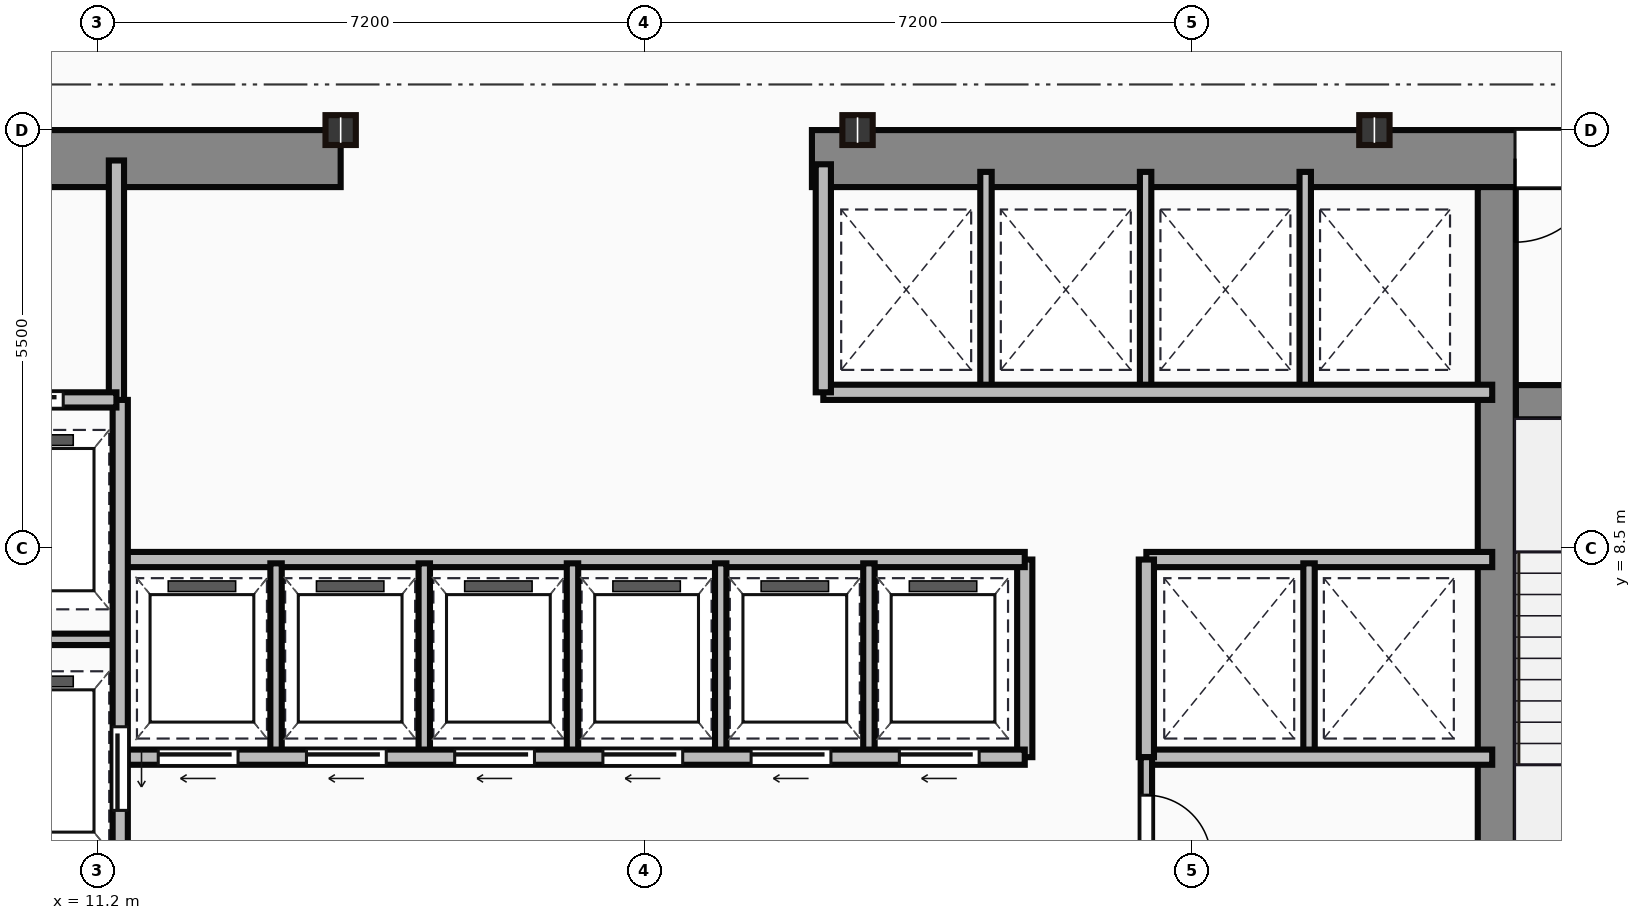
"""IFC4 building model, lengths in metres.
Left out: names, types, materials, properties, quantities, classifications, styles, units other than length and angle.
Written with IfcOpenShell. Run it as: python <this file> out.ifc"""

import sys

from ifc_helpers import new_model, si_unit, direction, frame, frame_2d, origin, origin_2d, place, context, subcontext, project, spatial, rectangle, i_section, extrude, source, transform, mapped, element, fill, save


model = new_model("IFC4")
c1 = context("Model", 3, precision=1e-05, world=origin(), true_north=direction((0.0, 1.0)))
c2 = subcontext(c1, "Body", "Model", "MODEL_VIEW")
j1 = project(units=[si_unit("LENGTHUNIT", "METRE"), si_unit("PLANEANGLEUNIT", "RADIAN")], contexts=[c1])
p1 = place(None, origin())
s1 = spatial("IfcSite", under=j1, at=p1, CompositionType="ELEMENT")
p2 = place(p1, origin())
s2 = spatial("IfcBuilding", under=s1, at=p2, CompositionType="ELEMENT")
p3 = place(p2, frame((0.0, 0.0, 117.85)))
s3 = spatial("IfcBuildingStorey", under=s2, at=p3, CompositionType="ELEMENT", Elevation=117.85)
m1 = source(origin(), c2, "Body", "SweptSolid", [
    extrude(rectangle(XDim=9.1, YDim=0.75, at=frame_2d((4.55, 0.0))), origin(), (0.0, 0.0, 1.0), 3.65),
])
p4 = place(p3, frame((5.3, 13.625, 0.0), z_axis=(0.0, 0.0, 1.0), x_axis=(1.0, 0.0, 0.0)))
e1 = element("IfcWall", 1, at=p4, inside=s3, PredefinedType="SHEAR", context=c2, shape_type="MappedRepresentation", body=[
    mapped(m1, transform((0.0, 0.0, 0.0))),
])
p5 = place(p4, frame((4.1, 0.0, 0.0)))
e2 = element("IfcOpeningElement", 2, at=p5, cuts=e1, PredefinedType="OPENING", context=c2, shape_type="SweptSolid", body=[
    extrude(rectangle(XDim=1.1, YDim=2.15, at=frame_2d((0.55, 1.075))), frame((0.0, 0.385, 0.0), z_axis=(0.0, -1.0, 0.0), x_axis=(1.0, 0.0, 0.0)), (0.0, 0.0, 1.0), 0.77),
])
m2 = source(origin(), c2, "Body", "SweptSolid", [
    extrude(rectangle(XDim=12.6, YDim=0.75, at=frame_2d((6.3, 0.0))), origin(), (0.0, 0.0, 1.0), 3.65),
])
p6 = place(p3, frame((20.6, 13.625, 0.0), z_axis=(0.0, 0.0, 1.0), x_axis=(1.0, 0.0, 0.0)))
e3 = element("IfcWall", 3, at=p6, inside=s3, PredefinedType="SHEAR", context=c2, shape_type="MappedRepresentation", body=[
    mapped(m2, transform((0.0, 0.0, 0.0))),
])
p7 = place(p6, frame((9.25, 0.0, 0.0)))
e4 = element("IfcOpeningElement", 4, at=p7, cuts=e3, PredefinedType="OPENING", context=c2, shape_type="SweptSolid", body=[
    extrude(rectangle(XDim=1.1, YDim=2.15, at=frame_2d((0.55, 1.075))), frame((0.0, 0.385, 0.0), z_axis=(0.0, -1.0, 0.0), x_axis=(1.0, 0.0, 0.0)), (0.0, 0.0, 1.0), 0.77),
])
m3 = source(origin(), c2, "Body", "SweptSolid", [
    extrude(rectangle(XDim=12.35, YDim=0.5, at=frame_2d((6.175, 0.0))), origin(), (0.0, 0.0, 1.0), 3.65),
])
p8 = place(p3, frame((29.61, 0.9, 0.0), z_axis=(0.0, 0.0, 1.0), x_axis=(0.0, 1.0, 0.0)))
e5 = element("IfcWall", 5, at=p8, inside=s3, PredefinedType="SHEAR", context=c2, shape_type="MappedRepresentation", body=[
    mapped(m3, transform((0.0, 0.0, 0.0))),
])
m4 = source(origin(), c2, "Body", "SweptSolid", [
    extrude(rectangle(XDim=3.39, YDim=0.45, at=frame_2d((1.695, 0.0))), origin(), (0.0, 0.0, 1.0), 3.65),
])
p9 = place(p3, frame((29.86, 10.42, 0.0), z_axis=(0.0, 0.0, 1.0), x_axis=(1.0, 0.0, 0.0)))
e6 = element("IfcWall", 6, at=p9, inside=s3, PredefinedType="SHEAR", context=c2, shape_type="MappedRepresentation", body=[
    mapped(m4, transform((0.0, 0.0, 0.0))),
])
p10 = place(p9, frame((1.1, 0.0, 0.0)))
e7 = element("IfcOpeningElement", 7, at=p10, cuts=e6, PredefinedType="OPENING", context=c2, shape_type="SweptSolid", body=[
    extrude(rectangle(XDim=1.1, YDim=2.15, at=frame_2d((0.55, 1.075))), frame((0.0, 0.235, 0.0), z_axis=(0.0, -1.0, 0.0), x_axis=(1.0, 0.0, 0.0)), (0.0, 0.0, 1.0), 0.47),
])
m5 = source(origin(), c2, "Body", "SweptSolid", [
    extrude(i_section(OverallWidth=0.399, OverallDepth=0.393, WebThickness=0.023, FlangeThickness=0.037, at=origin_2d()), origin(), (0.0, 0.0, 1.0), 3.65),
])
for number, where, z_axis, x_axis in (
    (8, (14.4, 14.0, 0.0), (0.0, 0.0, 1.0), (1.0, 0.0, 0.0)),
    (9, (21.2, 14.0, 0.0), (0.0, 0.0, 1.0), (1.0, 0.0, 0.0)),
    (10, (28.0, 14.0, 0.0), (0.0, 0.0, 1.0), (1.0, 0.0, 0.0)),
):
    element("IfcColumn", number, at=place(p3, frame(where, z_axis=z_axis, x_axis=x_axis)), inside=s3, PredefinedType="COLUMN", context=c2, shape_type="MappedRepresentation", body=[
        mapped(m5, transform((0.0, 0.0, 0.0))),
    ])
m6 = source(origin(), c2, "Body", "SweptSolid", [
    extrude(rectangle(XDim=3.18, YDim=0.2, at=frame_2d((1.59, 0.0))), origin(), (0.0, 0.0, 1.0), 3.4),
])
p11 = place(p3, frame((11.45, 10.42, 0.0), z_axis=(0.0, 0.0, 1.0), x_axis=(0.0, 1.0, 0.0)))
e11 = element("IfcWall", 11, at=p11, inside=s3, PredefinedType="PARTITIONING", context=c2, shape_type="MappedRepresentation", body=[
    mapped(m6, transform((0.0, 0.0, 0.0))),
])
m7 = source(origin(), c2, "Body", "SweptSolid", [
    extrude(rectangle(XDim=2.35, YDim=0.2, at=frame_2d((1.175, 0.0))), origin(), (0.0, 0.0, 1.0), 3.4),
])
p12 = place(p3, frame((9.1, 10.45, 0.0), z_axis=(0.0, 0.0, 1.0), x_axis=(1.0, 0.0, 0.0)))
e12 = element("IfcWall", 12, at=p12, inside=s3, PredefinedType="PARTITIONING", context=c2, shape_type="MappedRepresentation", body=[
    mapped(m7, transform((0.0, 0.0, 0.0))),
])
p13 = place(p12, frame((0.55, 0.0, 0.0)))
e13 = element("IfcOpeningElement", 13, at=p13, cuts=e12, PredefinedType="OPENING", context=c2, shape_type="SweptSolid", body=[
    extrude(rectangle(XDim=1.1, YDim=2.15, at=frame_2d((0.55, 1.075))), frame((0.0, 0.11, 0.0), z_axis=(0.0, -1.0, 0.0), x_axis=(1.0, 0.0, 0.0)), (0.0, 0.0, 1.0), 0.22),
])
m8 = source(origin(), c2, "Body", "SweptSolid", [
    extrude(rectangle(XDim=9.6, YDim=0.2, at=frame_2d((4.8, 0.0))), origin(), (0.0, 0.0, 1.0), 3.4),
])
p14 = place(p3, frame((11.5, 0.85, 0.0), z_axis=(0.0, 0.0, 1.0), x_axis=(0.0, 1.0, 0.0)))
e14 = element("IfcWall", 14, at=p14, inside=s3, PredefinedType="PARTITIONING", context=c2, shape_type="MappedRepresentation", body=[
    mapped(m8, transform((0.0, 0.0, 0.0))),
])
p15 = place(p14, frame((4.2, 0.0, 0.0)))
e15 = element("IfcOpeningElement", 15, at=p15, cuts=e14, PredefinedType="OPENING", context=c2, shape_type="SweptSolid", body=[
    extrude(rectangle(XDim=1.1, YDim=2.15, at=frame_2d((0.55, 1.075))), frame((0.0, 0.11, 0.0), z_axis=(0.0, -1.0, 0.0), x_axis=(1.0, 0.0, 0.0)), (0.0, 0.0, 1.0), 0.22),
])
p16 = place(p14, frame((0.9, 0.0, 0.0)))
e16 = element("IfcOpeningElement", 16, at=p16, cuts=e14, PredefinedType="OPENING", context=c2, shape_type="SweptSolid", body=[
    extrude(rectangle(XDim=1.2, YDim=2.15, at=frame_2d((0.6, 1.075))), frame((0.0, 0.11, 0.0), z_axis=(0.0, -1.0, 0.0), x_axis=(1.0, 0.0, 0.0)), (0.0, 0.0, 1.0), 0.22),
])
m9 = source(origin(), c2, "Body", "SweptSolid", [
    extrude(rectangle(XDim=2.4, YDim=0.15, at=frame_2d((1.2, 0.0))), origin(), (0.0, 0.0, 1.0), 3.4),
])
p17 = place(p3, frame((9.1, 7.3, 0.0), z_axis=(0.0, 0.0, 1.0), x_axis=(1.0, 0.0, 0.0)))
e17 = element("IfcWall", 17, at=p17, inside=s3, PredefinedType="PARTITIONING", context=c2, shape_type="MappedRepresentation", body=[
    mapped(m9, transform((0.0, 0.0, 0.0))),
])
m10 = source(origin(), c2, "Body", "SweptSolid", [
    extrude(rectangle(XDim=11.85, YDim=0.2, at=frame_2d((5.925, 0.0))), origin(), (0.0, 0.0, 1.0), 3.4),
])
p18 = place(p3, frame((11.55, 5.75, 0.0), z_axis=(0.0, 0.0, 1.0), x_axis=(1.0, 0.0, 0.0)))
e18 = element("IfcWall", 18, at=p18, inside=s3, PredefinedType="PARTITIONING", context=c2, shape_type="MappedRepresentation", body=[
    mapped(m10, transform((0.0, 0.0, 0.0))),
])
p19 = place(p18, frame((0.45, 0.0, 0.0)))
e19 = element("IfcOpeningElement", 19, at=p19, cuts=e18, PredefinedType="OPENING", context=c2, shape_type="SweptSolid", body=[
    extrude(rectangle(XDim=1.05, YDim=2.15, at=frame_2d((0.525, 1.075))), frame((0.0, 0.11, 0.0), z_axis=(0.0, -1.0, 0.0), x_axis=(1.0, 0.0, 0.0)), (0.0, 0.0, 1.0), 0.22),
])
p20 = place(p18, frame((2.4, 0.0, 0.0)))
e20 = element("IfcOpeningElement", 20, at=p20, cuts=e18, PredefinedType="OPENING", context=c2, shape_type="SweptSolid", body=[
    extrude(rectangle(XDim=1.05, YDim=2.15, at=frame_2d((0.525, 1.075))), frame((0.0, 0.11, 0.0), z_axis=(0.0, -1.0, 0.0), x_axis=(1.0, 0.0, 0.0)), (0.0, 0.0, 1.0), 0.22),
])
p21 = place(p18, frame((4.35, 0.0, 0.0)))
e21 = element("IfcOpeningElement", 21, at=p21, cuts=e18, PredefinedType="OPENING", context=c2, shape_type="SweptSolid", body=[
    extrude(rectangle(XDim=1.05, YDim=2.15, at=frame_2d((0.525, 1.075))), frame((0.0, 0.11, 0.0), z_axis=(0.0, -1.0, 0.0), x_axis=(1.0, 0.0, 0.0)), (0.0, 0.0, 1.0), 0.22),
])
p22 = place(p18, frame((6.3, 0.0, 0.0)))
e22 = element("IfcOpeningElement", 22, at=p22, cuts=e18, PredefinedType="OPENING", context=c2, shape_type="SweptSolid", body=[
    extrude(rectangle(XDim=1.05, YDim=2.15, at=frame_2d((0.525, 1.075))), frame((0.0, 0.11, 0.0), z_axis=(0.0, -1.0, 0.0), x_axis=(1.0, 0.0, 0.0)), (0.0, 0.0, 1.0), 0.22),
])
p23 = place(p18, frame((8.25, 0.0, 0.0)))
e23 = element("IfcOpeningElement", 23, at=p23, cuts=e18, PredefinedType="OPENING", context=c2, shape_type="SweptSolid", body=[
    extrude(rectangle(XDim=1.05, YDim=2.15, at=frame_2d((0.525, 1.075))), frame((0.0, 0.11, 0.0), z_axis=(0.0, -1.0, 0.0), x_axis=(1.0, 0.0, 0.0)), (0.0, 0.0, 1.0), 0.22),
])
p24 = place(p18, frame((10.2, 0.0, 0.0)))
e24 = element("IfcOpeningElement", 24, at=p24, cuts=e18, PredefinedType="OPENING", context=c2, shape_type="SweptSolid", body=[
    extrude(rectangle(XDim=1.05, YDim=2.15, at=frame_2d((0.525, 1.075))), frame((0.0, 0.11, 0.0), z_axis=(0.0, -1.0, 0.0), x_axis=(1.0, 0.0, 0.0)), (0.0, 0.0, 1.0), 0.22),
])
p25 = place(p3, frame((11.55, 8.35, 0.0), z_axis=(0.0, 0.0, 1.0), x_axis=(1.0, 0.0, 0.0)))
e25 = element("IfcWall", 25, at=p25, inside=s3, PredefinedType="PARTITIONING", context=c2, shape_type="MappedRepresentation", body=[
    mapped(m10, transform((0.0, 0.0, 0.0))),
])
m11 = source(origin(), c2, "Body", "SweptSolid", [
    extrude(rectangle(XDim=2.6, YDim=0.2, at=frame_2d((1.3, 0.0))), origin(), (0.0, 0.0, 1.0), 3.4),
])
p26 = place(p3, frame((23.4, 5.75, 0.0), z_axis=(0.0, 0.0, 1.0), x_axis=(0.0, 1.0, 0.0)))
e26 = element("IfcWall", 26, at=p26, inside=s3, PredefinedType="PARTITIONING", context=c2, shape_type="MappedRepresentation", body=[
    mapped(m11, transform((0.0, 0.0, 0.0))),
])
m12 = source(origin(), c2, "Body", "SweptSolid", [
    extrude(rectangle(XDim=2.5, YDim=0.15, at=frame_2d((1.25, 0.0))), origin(), (0.0, 0.0, 1.0), 3.4),
])
for number, where, z_axis, x_axis in (
    (27, (13.55, 5.8, 0.0), (0.0, 0.0, 1.0), (0.0, 1.0, 0.0)),
    (28, (15.5, 5.8, 0.0), (0.0, 0.0, 1.0), (0.0, 1.0, 0.0)),
    (29, (17.45, 5.8, 0.0), (0.0, 0.0, 1.0), (0.0, 1.0, 0.0)),
    (30, (19.4, 5.8, 0.0), (0.0, 0.0, 1.0), (0.0, 1.0, 0.0)),
    (31, (21.35, 5.8, 0.0), (0.0, 0.0, 1.0), (0.0, 1.0, 0.0)),
):
    element("IfcWall", number, at=place(p3, frame(where, z_axis=z_axis, x_axis=x_axis)), inside=s3, PredefinedType="PARTITIONING", context=c2, shape_type="MappedRepresentation", body=[
        mapped(m12, transform((0.0, 0.0, 0.0))),
    ])
m13 = source(origin(), c2, "Body", "SweptSolid", [
    extrude(rectangle(XDim=8.8, YDim=0.2, at=frame_2d((4.4, 0.0))), origin(), (0.0, 0.0, 1.0), 3.4),
])
p27 = place(p3, frame((20.75, 10.55, 0.0), z_axis=(0.0, 0.0, 1.0), x_axis=(1.0, 0.0, 0.0)))
e32 = element("IfcWall", 32, at=p27, inside=s3, PredefinedType="PARTITIONING", context=c2, shape_type="MappedRepresentation", body=[
    mapped(m13, transform((0.0, 0.0, 0.0))),
])
m14 = source(origin(), c2, "Body", "SweptSolid", [
    extrude(rectangle(XDim=3.0, YDim=0.2, at=frame_2d((1.5, 0.0))), origin(), (0.0, 0.0, 1.0), 3.4),
])
p28 = place(p3, frame((20.75, 10.55, 0.0), z_axis=(0.0, 0.0, 1.0), x_axis=(0.0, 1.0, 0.0)))
e33 = element("IfcWall", 33, at=p28, inside=s3, PredefinedType="PARTITIONING", context=c2, shape_type="MappedRepresentation", body=[
    mapped(m14, transform((0.0, 0.0, 0.0))),
])
m15 = source(origin(), c2, "Body", "SweptSolid", [
    extrude(rectangle(XDim=2.85, YDim=0.15, at=frame_2d((1.425, 0.0))), origin(), (0.0, 0.0, 1.0), 3.4),
])
for number, where, z_axis, x_axis in (
    (34, (22.89, 10.6, 0.0), (0.0, 0.0, 1.0), (0.0, 1.0, 0.0)),
    (35, (24.99, 10.6, 0.0), (0.0, 0.0, 1.0), (0.0, 1.0, 0.0)),
    (36, (27.09, 10.6, 0.0), (0.0, 0.0, 1.0), (0.0, 1.0, 0.0)),
):
    element("IfcWall", number, at=place(p3, frame(where, z_axis=z_axis, x_axis=x_axis)), inside=s3, PredefinedType="PARTITIONING", context=c2, shape_type="MappedRepresentation", body=[
        mapped(m15, transform((0.0, 0.0, 0.0))),
    ])
m16 = source(origin(), c2, "Body", "SweptSolid", [
    extrude(rectangle(XDim=4.55, YDim=0.2, at=frame_2d((2.275, 0.0))), origin(), (0.0, 0.0, 1.0), 3.4),
])
for number, where, z_axis, x_axis in (
    (37, (25.0, 8.35, 0.0), (0.0, 0.0, 1.0), (1.0, 0.0, 0.0)),
    (38, (25.0, 5.75, 0.0), (0.0, 0.0, 1.0), (1.0, 0.0, 0.0)),
):
    element("IfcWall", number, at=place(p3, frame(where, z_axis=z_axis, x_axis=x_axis)), inside=s3, PredefinedType="PARTITIONING", context=c2, shape_type="MappedRepresentation", body=[
        mapped(m16, transform((0.0, 0.0, 0.0))),
    ])
p29 = place(p3, frame((25.0, 5.75, 0.0), z_axis=(0.0, 0.0, 1.0), x_axis=(0.0, 1.0, 0.0)))
e39 = element("IfcWall", 39, at=p29, inside=s3, PredefinedType="PARTITIONING", context=c2, shape_type="MappedRepresentation", body=[
    mapped(m11, transform((0.0, 0.0, 0.0))),
])
p30 = place(p3, frame((27.14, 5.8, 0.0), z_axis=(0.0, 0.0, 1.0), x_axis=(0.0, 1.0, 0.0)))
e40 = element("IfcWall", 40, at=p30, inside=s3, PredefinedType="PARTITIONING", context=c2, shape_type="MappedRepresentation", body=[
    mapped(m12, transform((0.0, 0.0, 0.0))),
])
m17 = source(origin(), c2, "Body", "SweptSolid", [
    extrude(rectangle(XDim=4.9, YDim=0.15, at=frame_2d((2.45, 0.0))), origin(), (0.0, 0.0, 1.0), 3.4),
])
p31 = place(p3, frame((25.0, 0.85, 0.0), z_axis=(0.0, 0.0, 1.0), x_axis=(0.0, 1.0, 0.0)))
e41 = element("IfcWall", 41, at=p31, inside=s3, PredefinedType="PARTITIONING", context=c2, shape_type="MappedRepresentation", body=[
    mapped(m17, transform((0.0, 0.0, 0.0))),
])
p32 = place(p31, frame((1.85, 0.0, 0.0)))
e42 = element("IfcOpeningElement", 42, at=p32, cuts=e41, PredefinedType="OPENING", context=c2, shape_type="SweptSolid", body=[
    extrude(rectangle(XDim=0.95, YDim=2.15, at=frame_2d((0.475, 1.075))), frame((0.0, 0.085, 0.0), z_axis=(0.0, -1.0, 0.0), x_axis=(1.0, 0.0, 0.0)), (0.0, 0.0, 1.0), 0.17),
])
p33 = place(p31, frame((3.55, 0.0, 0.0)))
e43 = element("IfcOpeningElement", 43, at=p33, cuts=e41, PredefinedType="OPENING", context=c2, shape_type="SweptSolid", body=[
    extrude(rectangle(XDim=0.85, YDim=2.15, at=frame_2d((0.425, 1.075))), frame((0.0, 0.085, 0.0), z_axis=(0.0, -1.0, 0.0), x_axis=(1.0, 0.0, 0.0)), (0.0, 0.0, 1.0), 0.17),
])
m18 = source(origin(), c2, "Body", "SweptSolid", [
    extrude(rectangle(XDim=1.1, YDim=2.15, at=frame_2d((0.55, 1.075))), frame((0.0, 0.025, 0.0), z_axis=(0.0, -1.0, 0.0), x_axis=(1.0, 0.0, 0.0)), (0.0, 0.0, 1.0), 0.05),
])
p34 = place(p7, origin())
e44 = element("IfcDoor", 44, at=p34, inside=s3, OperationType="SINGLE_SWING_LEFT", PredefinedType="DOOR", context=c2, shape_type="MappedRepresentation", body=[
    mapped(m18, transform((0.0, 0.0, 0.0))),
])
fill(e4, e44)
p35 = place(p13, origin())
e45 = element("IfcDoor", 45, at=p35, inside=s3, OperationType="SLIDING_TO_LEFT", PredefinedType="DOOR", context=c2, shape_type="MappedRepresentation", body=[
    mapped(m18, transform((0.0, 0.0, 0.0))),
])
fill(e13, e45)
p36 = place(p15, frame((1.1, 0.0, 0.0), z_axis=(0.0, 0.0, 1.0), x_axis=(-1.0, 0.0, 0.0)))
e46 = element("IfcDoor", 46, at=p36, inside=s3, OperationType="SLIDING_TO_LEFT", PredefinedType="DOOR", context=c2, shape_type="MappedRepresentation", body=[
    mapped(m18, transform((0.0, 0.0, 0.0))),
])
fill(e15, e46)
m19 = source(origin(), c2, "Body", "SweptSolid", [
    extrude(rectangle(XDim=1.05, YDim=2.15, at=frame_2d((0.525, 1.075))), frame((0.0, 0.025, 0.0), z_axis=(0.0, -1.0, 0.0), x_axis=(1.0, 0.0, 0.0)), (0.0, 0.0, 1.0), 0.05),
])
p37 = place(p19, frame((1.05, 0.0, 0.0), z_axis=(0.0, 0.0, 1.0), x_axis=(-1.0, 0.0, 0.0)))
e47 = element("IfcDoor", 47, at=p37, inside=s3, OperationType="SLIDING_TO_LEFT", PredefinedType="DOOR", context=c2, shape_type="MappedRepresentation", body=[
    mapped(m19, transform((0.0, 0.0, 0.0))),
])
fill(e19, e47)
p38 = place(p20, frame((1.05, 0.0, 0.0), z_axis=(0.0, 0.0, 1.0), x_axis=(-1.0, 0.0, 0.0)))
e48 = element("IfcDoor", 48, at=p38, inside=s3, OperationType="SLIDING_TO_LEFT", PredefinedType="DOOR", context=c2, shape_type="MappedRepresentation", body=[
    mapped(m19, transform((0.0, 0.0, 0.0))),
])
fill(e20, e48)
p39 = place(p21, frame((1.05, 0.0, 0.0), z_axis=(0.0, 0.0, 1.0), x_axis=(-1.0, 0.0, 0.0)))
e49 = element("IfcDoor", 49, at=p39, inside=s3, OperationType="SLIDING_TO_LEFT", PredefinedType="DOOR", context=c2, shape_type="MappedRepresentation", body=[
    mapped(m19, transform((0.0, 0.0, 0.0))),
])
fill(e21, e49)
p40 = place(p22, frame((1.05, 0.0, 0.0), z_axis=(0.0, 0.0, 1.0), x_axis=(-1.0, 0.0, 0.0)))
e50 = element("IfcDoor", 50, at=p40, inside=s3, OperationType="SLIDING_TO_LEFT", PredefinedType="DOOR", context=c2, shape_type="MappedRepresentation", body=[
    mapped(m19, transform((0.0, 0.0, 0.0))),
])
fill(e22, e50)
p41 = place(p23, frame((1.05, 0.0, 0.0), z_axis=(0.0, 0.0, 1.0), x_axis=(-1.0, 0.0, 0.0)))
e51 = element("IfcDoor", 51, at=p41, inside=s3, OperationType="SLIDING_TO_LEFT", PredefinedType="DOOR", context=c2, shape_type="MappedRepresentation", body=[
    mapped(m19, transform((0.0, 0.0, 0.0))),
])
fill(e23, e51)
p42 = place(p24, frame((1.05, 0.0, 0.0), z_axis=(0.0, 0.0, 1.0), x_axis=(-1.0, 0.0, 0.0)))
e52 = element("IfcDoor", 52, at=p42, inside=s3, OperationType="SLIDING_TO_LEFT", PredefinedType="DOOR", context=c2, shape_type="MappedRepresentation", body=[
    mapped(m19, transform((0.0, 0.0, 0.0))),
])
fill(e24, e52)
m20 = source(origin(), c2, "Body", "SweptSolid", [
    extrude(rectangle(XDim=0.85, YDim=2.15, at=frame_2d((0.425, 1.075))), frame((0.0, 0.025, 0.0), z_axis=(0.0, -1.0, 0.0), x_axis=(1.0, 0.0, 0.0)), (0.0, 0.0, 1.0), 0.05),
])
p43 = place(p33, origin())
e53 = element("IfcDoor", 53, at=p43, inside=s3, OperationType="SINGLE_SWING_LEFT", PredefinedType="DOOR", context=c2, shape_type="MappedRepresentation", body=[
    mapped(m20, transform((0.0, 0.0, 0.0))),
])
fill(e43, e53)
save(model, sys.argv[1])
